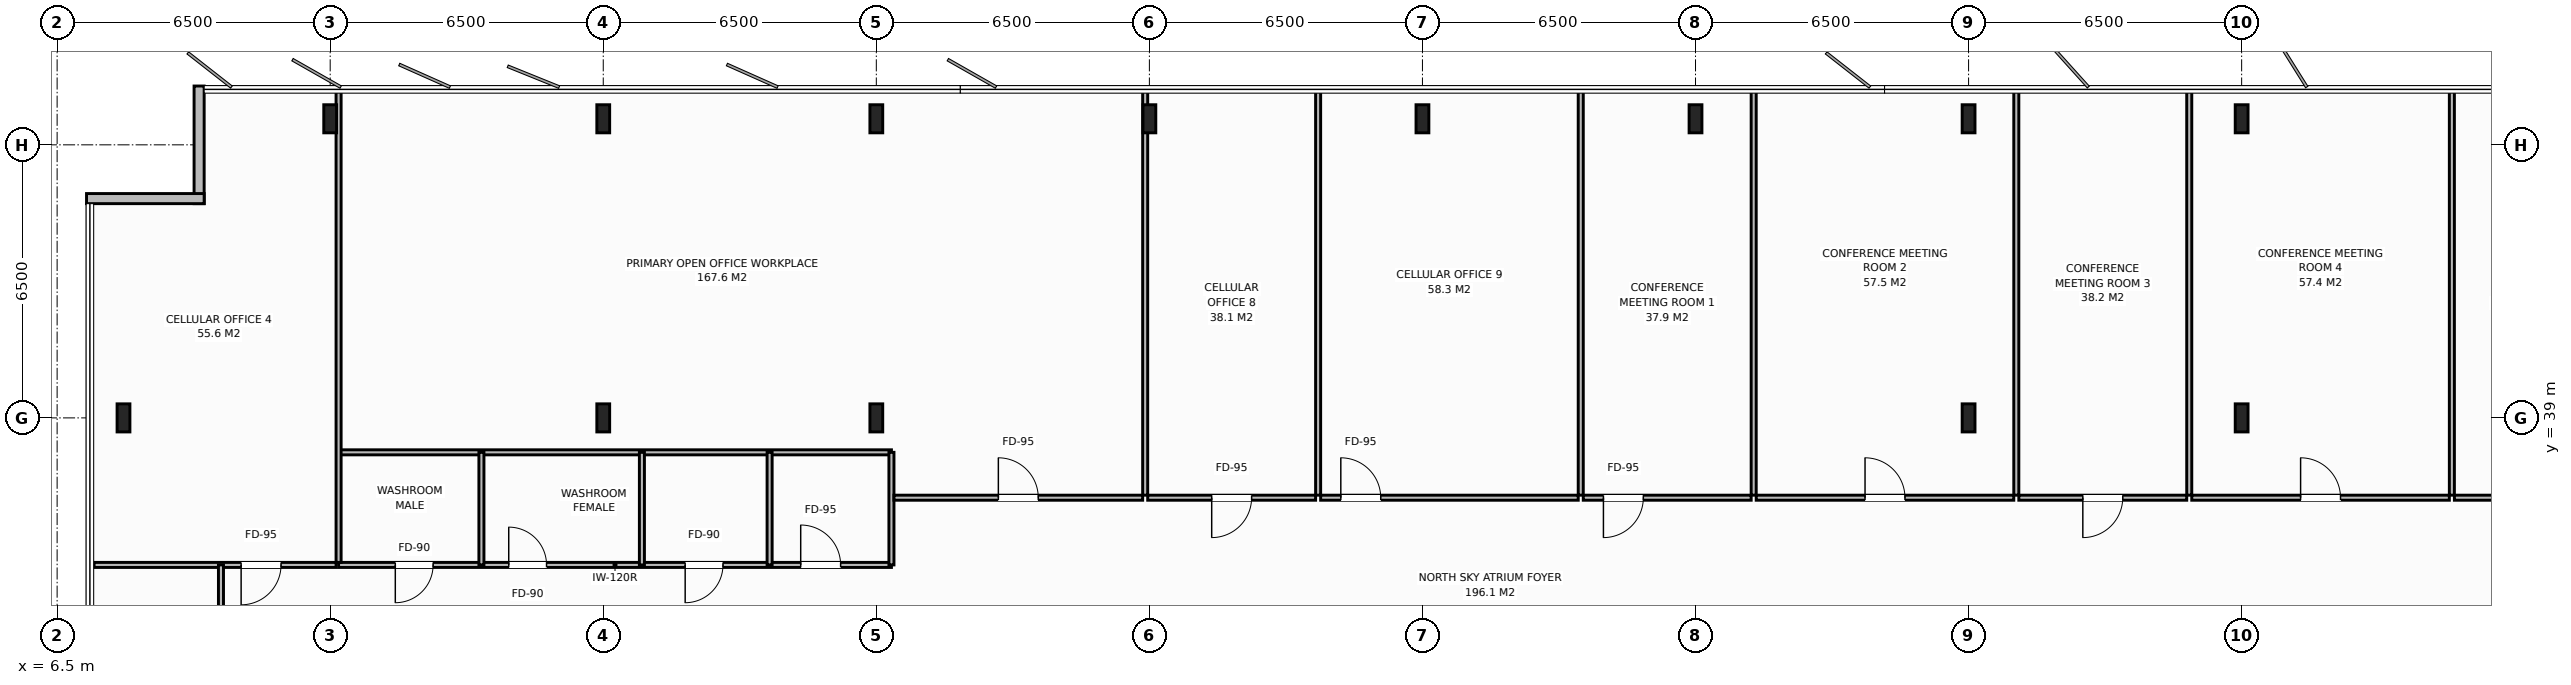
"""IFC4 building model, lengths in metres.
Left out: names, types, materials, properties, quantities, classifications, styles, units other than length and angle.
Written with IfcOpenShell. Run it as: python <this file> out.ifc"""

import sys

from ifc_helpers import new_model, si_unit, direction, frame, frame_2d, origin, origin_2d, place, context, subcontext, project, spatial, rectangle, i_section, extrude, element, fill, save


model = new_model("IFC4")
c1 = context("Model", 3, precision=1e-05, world=origin(), true_north=direction((0.0, 1.0)))
c2 = subcontext(c1, "Body", "Model", "MODEL_VIEW")
j1 = project(units=[si_unit("LENGTHUNIT", "METRE"), si_unit("PLANEANGLEUNIT", "RADIAN")], contexts=[c1])
p1 = place(None, origin())
s1 = spatial("IfcSite", under=j1, at=p1, CompositionType="ELEMENT")
p2 = place(p1, origin())
s2 = spatial("IfcBuilding", under=s1, at=p2, CompositionType="ELEMENT")
p3 = place(p2, frame((0.0, 0.0, 302.4)))
s3 = spatial("IfcBuildingStorey", under=s2, at=p3, CompositionType="ELEMENT", Elevation=302.4)
for number, where, z_axis, x_axis in (
    (1, (19.5, 39.0, 0.0), (0.0, 0.0, 1.0), (1.0, 0.0, 0.0)),
    (2, (58.5, 39.0, 0.0), (0.0, 0.0, 1.0), (1.0, 0.0, 0.0)),
    (3, (26.0, 39.0, 0.0), (0.0, 0.0, 1.0), (1.0, 0.0, 0.0)),
    (4, (52.0, 39.0, 0.0), (0.0, 0.0, 1.0), (1.0, 0.0, 0.0)),
    (5, (13.0, 46.12, 0.0), (0.0, 0.0, 1.0), (1.0, 0.0, 0.0)),
    (6, (19.5, 46.12, 0.0), (0.0, 0.0, 1.0), (1.0, 0.0, 0.0)),
    (7, (26.0, 46.12, 0.0), (0.0, 0.0, 1.0), (1.0, 0.0, 0.0)),
    (8, (32.5, 46.12, 0.0), (0.0, 0.0, 1.0), (1.0, 0.0, 0.0)),
    (9, (39.0, 46.12, 0.0), (0.0, 0.0, 1.0), (1.0, 0.0, 0.0)),
    (10, (45.5, 46.12, 0.0), (0.0, 0.0, 1.0), (1.0, 0.0, 0.0)),
    (11, (52.0, 46.12, 0.0), (0.0, 0.0, 1.0), (1.0, 0.0, 0.0)),
    (12, (58.5, 46.12, 0.0), (0.0, 0.0, 1.0), (1.0, 0.0, 0.0)),
    (13, (8.08, 39.0, 0.0), (0.0, 0.0, 1.0), (1.0, 0.0, 0.0)),
):
    element("IfcColumn", number, at=place(p3, frame(where, z_axis=z_axis, x_axis=x_axis)), inside=s3, PredefinedType="COLUMN", context=c2, shape_type="SweptSolid", body=[
        extrude(i_section(OverallWidth=0.305, OverallDepth=0.668, WebThickness=0.021, FlangeThickness=0.04, at=origin_2d()), origin(), (0.0, 0.0, 1.0), 4.0),
    ])
p4 = place(p3, frame((9.88, 44.1, 0.0), z_axis=(0.0, 0.0, 1.0), x_axis=(0.0, 1.0, 0.0)))
e14 = element("IfcWall", 14, at=p4, inside=s3, PredefinedType="STANDARD", context=c2, shape_type="SweptSolid", body=[
    extrude(rectangle(XDim=2.8, YDim=0.24, at=frame_2d((1.4, 0.0))), origin(), (0.0, 0.0, 1.0), 3.788),
])
p5 = place(p3, frame((7.2, 44.22, 0.0), z_axis=(0.0, 0.0, 1.0), x_axis=(1.0, 0.0, 0.0)))
e15 = element("IfcWall", 15, at=p5, inside=s3, PredefinedType="STANDARD", context=c2, shape_type="SweptSolid", body=[
    extrude(rectangle(XDim=2.8, YDim=0.24, at=frame_2d((1.4, 0.0))), origin(), (0.0, 0.0, 1.0), 3.788),
])
p6 = place(p3, frame((13.2, 35.5, 0.0), z_axis=(0.0, 0.0, 1.0), x_axis=(1.0, 0.0, 0.0)))
e16 = element("IfcWall", 16, at=p6, inside=s3, PredefinedType="PARTITIONING", context=c2, shape_type="SweptSolid", body=[
    extrude(rectangle(XDim=13.16, YDim=0.12, at=frame_2d((6.58, 0.0))), origin(), (0.0, 0.0, 1.0), 3.788),
])
p7 = place(p6, frame((1.35, 0.0, 0.0)))
e17 = element("IfcOpeningElement", 17, at=p7, cuts=e16, PredefinedType="OPENING", context=c2, shape_type="SweptSolid", body=[
    extrude(rectangle(XDim=0.9, YDim=2.15, at=frame_2d((0.45, 1.075))), frame((0.0, 0.07, 0.0), z_axis=(0.0, -1.0, 0.0), x_axis=(1.0, 0.0, 0.0)), (0.0, 0.0, 1.0), 0.14),
])
p8 = place(p6, frame((4.05, 0.0, 0.0)))
e18 = element("IfcOpeningElement", 18, at=p8, cuts=e16, PredefinedType="OPENING", context=c2, shape_type="SweptSolid", body=[
    extrude(rectangle(XDim=0.9, YDim=2.15, at=frame_2d((0.45, 1.075))), frame((0.0, 0.07, 0.0), z_axis=(0.0, -1.0, 0.0), x_axis=(1.0, 0.0, 0.0)), (0.0, 0.0, 1.0), 0.14),
])
p9 = place(p6, frame((8.25, 0.0, 0.0)))
e19 = element("IfcOpeningElement", 19, at=p9, cuts=e16, PredefinedType="OPENING", context=c2, shape_type="SweptSolid", body=[
    extrude(rectangle(XDim=0.9, YDim=2.15, at=frame_2d((0.45, 1.075))), frame((0.0, 0.07, 0.0), z_axis=(0.0, -1.0, 0.0), x_axis=(1.0, 0.0, 0.0)), (0.0, 0.0, 1.0), 0.14),
])
p10 = place(p6, frame((11.0, 0.0, 0.0)))
e20 = element("IfcOpeningElement", 20, at=p10, cuts=e16, PredefinedType="OPENING", context=c2, shape_type="SweptSolid", body=[
    extrude(rectangle(XDim=0.95, YDim=2.15, at=frame_2d((0.475, 1.075))), frame((0.0, 0.07, 0.0), z_axis=(0.0, -1.0, 0.0), x_axis=(1.0, 0.0, 0.0)), (0.0, 0.0, 1.0), 0.14),
])
p11 = place(p3, frame((13.2, 38.18, 0.0), z_axis=(0.0, 0.0, 1.0), x_axis=(1.0, 0.0, 0.0)))
e21 = element("IfcWall", 21, at=p11, inside=s3, PredefinedType="PARTITIONING", context=c2, shape_type="SweptSolid", body=[
    extrude(rectangle(XDim=13.16, YDim=0.12, at=frame_2d((6.58, 0.0))), origin(), (0.0, 0.0, 1.0), 3.788),
])
for number, where, z_axis, x_axis in (
    (22, (16.6, 35.5, 0.0), (0.0, 0.0, 1.0), (0.0, 1.0, 0.0)),
    (23, (20.42, 35.5, 0.0), (0.0, 0.0, 1.0), (0.0, 1.0, 0.0)),
    (24, (23.46, 35.5, 0.0), (0.0, 0.0, 1.0), (0.0, 1.0, 0.0)),
    (25, (26.36, 35.5, 0.0), (0.0, 0.0, 1.0), (0.0, 1.0, 0.0)),
):
    element("IfcWall", number, at=place(p3, frame(where, z_axis=z_axis, x_axis=x_axis)), inside=s3, PredefinedType="PARTITIONING", context=c2, shape_type="SweptSolid", body=[
        extrude(rectangle(XDim=2.68, YDim=0.12, at=frame_2d((1.34, 0.0))), origin(), (0.0, 0.0, 1.0), 3.788),
    ])
p12 = place(p3, frame((13.2, 35.56, 0.0), z_axis=(0.0, 0.0, 1.0), x_axis=(0.0, 1.0, 0.0)))
e26 = element("IfcWall", 26, at=p12, inside=s3, PredefinedType="PARTITIONING", context=c2, shape_type="SweptSolid", body=[
    extrude(rectangle(XDim=11.32, YDim=0.12, at=frame_2d((5.66, 0.0))), origin(), (0.0, 0.0, 1.0), 2.988),
])
p13 = place(p3, frame((7.38, 35.5, 0.0), z_axis=(0.0, 0.0, 1.0), x_axis=(1.0, 0.0, 0.0)))
e27 = element("IfcWall", 27, at=p13, inside=s3, PredefinedType="PARTITIONING", context=c2, shape_type="SweptSolid", body=[
    extrude(rectangle(XDim=5.76, YDim=0.12, at=frame_2d((2.88, 0.0))), origin(), (0.0, 0.0, 1.0), 3.788),
])
p14 = place(p13, frame((3.5, 0.0, 0.0)))
e28 = element("IfcOpeningElement", 28, at=p14, cuts=e27, PredefinedType="OPENING", context=c2, shape_type="SweptSolid", body=[
    extrude(rectangle(XDim=0.95, YDim=2.15, at=frame_2d((0.475, 1.075))), frame((0.0, 0.07, 0.0), z_axis=(0.0, -1.0, 0.0), x_axis=(1.0, 0.0, 0.0)), (0.0, 0.0, 1.0), 0.14),
])
p15 = place(p3, frame((32.4, 37.16, 0.0), z_axis=(0.0, 0.0, 1.0), x_axis=(0.0, 1.0, 0.0)))
e29 = element("IfcWall", 29, at=p15, inside=s3, PredefinedType="PARTITIONING", context=c2, shape_type="SweptSolid", body=[
    extrude(rectangle(XDim=9.72, YDim=0.12, at=frame_2d((4.86, 0.0))), origin(), (0.0, 0.0, 1.0), 2.988),
])
p16 = place(p3, frame((26.42, 37.1, 0.0), z_axis=(0.0, 0.0, 1.0), x_axis=(1.0, 0.0, 0.0)))
e30 = element("IfcWall", 30, at=p16, inside=s3, PredefinedType="PARTITIONING", context=c2, shape_type="SweptSolid", body=[
    extrude(rectangle(XDim=5.92, YDim=0.12, at=frame_2d((2.96, 0.0))), origin(), (0.0, 0.0, 1.0), 3.788),
])
p17 = place(p16, frame((2.485, 0.0, 0.0)))
e31 = element("IfcOpeningElement", 31, at=p17, cuts=e30, PredefinedType="OPENING", context=c2, shape_type="SweptSolid", body=[
    extrude(rectangle(XDim=0.95, YDim=2.15, at=frame_2d((0.475, 1.075))), frame((0.0, 0.07, 0.0), z_axis=(0.0, -1.0, 0.0), x_axis=(1.0, 0.0, 0.0)), (0.0, 0.0, 1.0), 0.14),
])
p18 = place(p3, frame((36.517, 37.16, 0.0), z_axis=(0.0, 0.0, 1.0), x_axis=(0.0, 1.0, 0.0)))
e32 = element("IfcWall", 32, at=p18, inside=s3, PredefinedType="PARTITIONING", context=c2, shape_type="SweptSolid", body=[
    extrude(rectangle(XDim=9.72, YDim=0.12, at=frame_2d((4.86, 0.0))), origin(), (0.0, 0.0, 1.0), 3.788),
])
p19 = place(p3, frame((32.46, 37.1, 0.0), z_axis=(0.0, 0.0, 1.0), x_axis=(1.0, 0.0, 0.0)))
e33 = element("IfcWall", 33, at=p19, inside=s3, PredefinedType="PARTITIONING", context=c2, shape_type="SweptSolid", body=[
    extrude(rectangle(XDim=3.997, YDim=0.12, at=frame_2d((1.999, 0.0))), origin(), (0.0, 0.0, 1.0), 3.788),
])
p20 = place(p19, frame((1.523, 0.0, 0.0)))
e34 = element("IfcOpeningElement", 34, at=p20, cuts=e33, PredefinedType="OPENING", context=c2, shape_type="SweptSolid", body=[
    extrude(rectangle(XDim=0.95, YDim=2.15, at=frame_2d((0.475, 1.075))), frame((0.0, 0.07, 0.0), z_axis=(0.0, -1.0, 0.0), x_axis=(1.0, 0.0, 0.0)), (0.0, 0.0, 1.0), 0.14),
])
p21 = place(p3, frame((42.768, 37.16, 0.0), z_axis=(0.0, 0.0, 1.0), x_axis=(0.0, 1.0, 0.0)))
e35 = element("IfcWall", 35, at=p21, inside=s3, PredefinedType="PARTITIONING", context=c2, shape_type="SweptSolid", body=[
    extrude(rectangle(XDim=9.72, YDim=0.12, at=frame_2d((4.86, 0.0))), origin(), (0.0, 0.0, 1.0), 3.788),
])
p22 = place(p3, frame((36.577, 37.1, 0.0), z_axis=(0.0, 0.0, 1.0), x_axis=(1.0, 0.0, 0.0)))
e36 = element("IfcWall", 36, at=p22, inside=s3, PredefinedType="PARTITIONING", context=c2, shape_type="SweptSolid", body=[
    extrude(rectangle(XDim=6.131, YDim=0.12, at=frame_2d((3.066, 0.0))), origin(), (0.0, 0.0, 1.0), 3.788),
])
p23 = place(p22, frame((0.48, 0.0, 0.0)))
e37 = element("IfcOpeningElement", 37, at=p23, cuts=e36, PredefinedType="OPENING", context=c2, shape_type="SweptSolid", body=[
    extrude(rectangle(XDim=0.95, YDim=2.15, at=frame_2d((0.475, 1.075))), frame((0.0, 0.07, 0.0), z_axis=(0.0, -1.0, 0.0), x_axis=(1.0, 0.0, 0.0)), (0.0, 0.0, 1.0), 0.14),
])
p24 = place(p3, frame((46.885, 37.16, 0.0), z_axis=(0.0, 0.0, 1.0), x_axis=(0.0, 1.0, 0.0)))
e38 = element("IfcWall", 38, at=p24, inside=s3, PredefinedType="PARTITIONING", context=c2, shape_type="SweptSolid", body=[
    extrude(rectangle(XDim=9.72, YDim=0.12, at=frame_2d((4.86, 0.0))), origin(), (0.0, 0.0, 1.0), 3.788),
])
p25 = place(p3, frame((42.828, 37.1, 0.0), z_axis=(0.0, 0.0, 1.0), x_axis=(1.0, 0.0, 0.0)))
e39 = element("IfcWall", 39, at=p25, inside=s3, PredefinedType="PARTITIONING", context=c2, shape_type="SweptSolid", body=[
    extrude(rectangle(XDim=3.997, YDim=0.12, at=frame_2d((1.999, 0.0))), origin(), (0.0, 0.0, 1.0), 3.788),
])
p26 = place(p25, frame((0.48, 0.0, 0.0)))
e40 = element("IfcOpeningElement", 40, at=p26, cuts=e39, PredefinedType="OPENING", context=c2, shape_type="SweptSolid", body=[
    extrude(rectangle(XDim=0.95, YDim=2.15, at=frame_2d((0.475, 1.075))), frame((0.0, 0.07, 0.0), z_axis=(0.0, -1.0, 0.0), x_axis=(1.0, 0.0, 0.0)), (0.0, 0.0, 1.0), 0.14),
])
p27 = place(p3, frame((53.136, 37.16, 0.0), z_axis=(0.0, 0.0, 1.0), x_axis=(0.0, 1.0, 0.0)))
e41 = element("IfcWall", 41, at=p27, inside=s3, PredefinedType="PARTITIONING", context=c2, shape_type="SweptSolid", body=[
    extrude(rectangle(XDim=9.72, YDim=0.12, at=frame_2d((4.86, 0.0))), origin(), (0.0, 0.0, 1.0), 3.788),
])
p28 = place(p3, frame((46.945, 37.1, 0.0), z_axis=(0.0, 0.0, 1.0), x_axis=(1.0, 0.0, 0.0)))
e42 = element("IfcWall", 42, at=p28, inside=s3, PredefinedType="PARTITIONING", context=c2, shape_type="SweptSolid", body=[
    extrude(rectangle(XDim=6.132, YDim=0.12, at=frame_2d((3.066, 0.0))), origin(), (0.0, 0.0, 1.0), 3.788),
])
p29 = place(p28, frame((2.591, 0.0, 0.0)))
e43 = element("IfcOpeningElement", 43, at=p29, cuts=e42, PredefinedType="OPENING", context=c2, shape_type="SweptSolid", body=[
    extrude(rectangle(XDim=0.95, YDim=2.15, at=frame_2d((0.475, 1.075))), frame((0.0, 0.07, 0.0), z_axis=(0.0, -1.0, 0.0), x_axis=(1.0, 0.0, 0.0)), (0.0, 0.0, 1.0), 0.14),
])
p30 = place(p3, frame((57.253, 37.16, 0.0), z_axis=(0.0, 0.0, 1.0), x_axis=(0.0, 1.0, 0.0)))
e44 = element("IfcWall", 44, at=p30, inside=s3, PredefinedType="PARTITIONING", context=c2, shape_type="SweptSolid", body=[
    extrude(rectangle(XDim=9.72, YDim=0.12, at=frame_2d((4.86, 0.0))), origin(), (0.0, 0.0, 1.0), 3.788),
])
p31 = place(p3, frame((53.196, 37.1, 0.0), z_axis=(0.0, 0.0, 1.0), x_axis=(1.0, 0.0, 0.0)))
e45 = element("IfcWall", 45, at=p31, inside=s3, PredefinedType="PARTITIONING", context=c2, shape_type="SweptSolid", body=[
    extrude(rectangle(XDim=3.997, YDim=0.12, at=frame_2d((1.999, 0.0))), origin(), (0.0, 0.0, 1.0), 3.788),
])
p32 = place(p31, frame((1.523, 0.0, 0.0)))
e46 = element("IfcOpeningElement", 46, at=p32, cuts=e45, PredefinedType="OPENING", context=c2, shape_type="SweptSolid", body=[
    extrude(rectangle(XDim=0.95, YDim=2.15, at=frame_2d((0.475, 1.075))), frame((0.0, 0.07, 0.0), z_axis=(0.0, -1.0, 0.0), x_axis=(1.0, 0.0, 0.0)), (0.0, 0.0, 1.0), 0.14),
])
p33 = place(p3, frame((63.504, 37.16, 0.0), z_axis=(0.0, 0.0, 1.0), x_axis=(0.0, 1.0, 0.0)))
e47 = element("IfcWall", 47, at=p33, inside=s3, PredefinedType="PARTITIONING", context=c2, shape_type="SweptSolid", body=[
    extrude(rectangle(XDim=9.72, YDim=0.12, at=frame_2d((4.86, 0.0))), origin(), (0.0, 0.0, 1.0), 3.788),
])
p34 = place(p3, frame((57.313, 37.1, 0.0), z_axis=(0.0, 0.0, 1.0), x_axis=(1.0, 0.0, 0.0)))
e48 = element("IfcWall", 48, at=p34, inside=s3, PredefinedType="PARTITIONING", context=c2, shape_type="SweptSolid", body=[
    extrude(rectangle(XDim=6.131, YDim=0.12, at=frame_2d((3.066, 0.0))), origin(), (0.0, 0.0, 1.0), 3.788),
])
p35 = place(p34, frame((2.591, 0.0, 0.0)))
e49 = element("IfcOpeningElement", 49, at=p35, cuts=e48, PredefinedType="OPENING", context=c2, shape_type="SweptSolid", body=[
    extrude(rectangle(XDim=0.95, YDim=2.15, at=frame_2d((0.475, 1.075))), frame((0.0, 0.07, 0.0), z_axis=(0.0, -1.0, 0.0), x_axis=(1.0, 0.0, 0.0)), (0.0, 0.0, 1.0), 0.14),
])
p36 = place(p3, frame((63.564, 37.1, 0.0), z_axis=(0.0, 0.0, 1.0), x_axis=(1.0, 0.0, 0.0)))
e50 = element("IfcWall", 50, at=p36, inside=s3, PredefinedType="PARTITIONING", context=c2, shape_type="SweptSolid", body=[
    extrude(rectangle(XDim=3.997, YDim=0.12, at=frame_2d((1.998, 0.0))), origin(), (0.0, 0.0, 1.0), 3.788),
])
p37 = place(p36, frame((2.567, 0.0, 0.0)))
e51 = element("IfcOpeningElement", 51, at=p37, cuts=e50, PredefinedType="OPENING", context=c2, shape_type="SweptSolid", body=[
    extrude(rectangle(XDim=0.95, YDim=2.15, at=frame_2d((0.475, 1.075))), frame((0.0, 0.07, 0.0), z_axis=(0.0, -1.0, 0.0), x_axis=(1.0, 0.0, 0.0)), (0.0, 0.0, 1.0), 0.14),
])
p38 = place(p3, frame((10.4, 16.5, 0.0), z_axis=(0.0, 0.0, 1.0), x_axis=(0.0, 1.0, 0.0)))
e52 = element("IfcWall", 52, at=p38, inside=s3, PredefinedType="PARTITIONING", context=c2, shape_type="SweptSolid", body=[
    extrude(rectangle(XDim=19.0, YDim=0.12, at=frame_2d((9.5, 0.0))), origin(), (0.0, 0.0, 1.0), 3.788),
])
p39 = place(p38, frame((9.025, 0.0, 0.0)))
e53 = element("IfcOpeningElement", 53, at=p39, cuts=e52, PredefinedType="OPENING", context=c2, shape_type="SweptSolid", body=[
    extrude(rectangle(XDim=0.95, YDim=2.15, at=frame_2d((0.475, 1.075))), frame((0.0, 0.07, 0.0), z_axis=(0.0, -1.0, 0.0), x_axis=(1.0, 0.0, 0.0)), (0.0, 0.0, 1.0), 0.14),
])
p40 = place(p7, origin())
e54 = element("IfcDoor", 54, at=p40, inside=s3, OperationType="SINGLE_SWING_RIGHT", PredefinedType="DOOR", context=c2, shape_type="SweptSolid", body=[
    extrude(rectangle(XDim=0.9, YDim=2.15, at=frame_2d((0.45, 1.075))), frame((0.0, 0.025, 0.0), z_axis=(0.0, -1.0, 0.0), x_axis=(1.0, 0.0, 0.0)), (0.0, 0.0, 1.0), 0.05),
])
fill(e17, e54)
p41 = place(p8, origin())
e55 = element("IfcDoor", 55, at=p41, inside=s3, OperationType="SINGLE_SWING_LEFT", PredefinedType="DOOR", context=c2, shape_type="SweptSolid", body=[
    extrude(rectangle(XDim=0.9, YDim=2.15, at=frame_2d((0.45, 1.075))), frame((0.0, 0.025, 0.0), z_axis=(0.0, -1.0, 0.0), x_axis=(1.0, 0.0, 0.0)), (0.0, 0.0, 1.0), 0.05),
])
fill(e18, e55)
p42 = place(p9, origin())
e56 = element("IfcDoor", 56, at=p42, inside=s3, OperationType="SINGLE_SWING_RIGHT", PredefinedType="DOOR", context=c2, shape_type="SweptSolid", body=[
    extrude(rectangle(XDim=0.9, YDim=2.15, at=frame_2d((0.45, 1.075))), frame((0.0, 0.025, 0.0), z_axis=(0.0, -1.0, 0.0), x_axis=(1.0, 0.0, 0.0)), (0.0, 0.0, 1.0), 0.05),
])
fill(e19, e56)
p43 = place(p10, origin())
e57 = element("IfcDoor", 57, at=p43, inside=s3, OperationType="SINGLE_SWING_LEFT", PredefinedType="DOOR", context=c2, shape_type="SweptSolid", body=[
    extrude(rectangle(XDim=0.95, YDim=2.15, at=frame_2d((0.475, 1.075))), frame((0.0, 0.025, 0.0), z_axis=(0.0, -1.0, 0.0), x_axis=(1.0, 0.0, 0.0)), (0.0, 0.0, 1.0), 0.05),
])
fill(e20, e57)
p44 = place(p14, origin())
e58 = element("IfcDoor", 58, at=p44, inside=s3, OperationType="SINGLE_SWING_RIGHT", PredefinedType="DOOR", context=c2, shape_type="SweptSolid", body=[
    extrude(rectangle(XDim=0.95, YDim=2.15, at=frame_2d((0.475, 1.075))), frame((0.0, 0.025, 0.0), z_axis=(0.0, -1.0, 0.0), x_axis=(1.0, 0.0, 0.0)), (0.0, 0.0, 1.0), 0.05),
])
fill(e28, e58)
p45 = place(p17, origin())
e59 = element("IfcDoor", 59, at=p45, inside=s3, OperationType="SINGLE_SWING_LEFT", PredefinedType="DOOR", context=c2, shape_type="SweptSolid", body=[
    extrude(rectangle(XDim=0.95, YDim=2.15, at=frame_2d((0.475, 1.075))), frame((0.0, 0.025, 0.0), z_axis=(0.0, -1.0, 0.0), x_axis=(1.0, 0.0, 0.0)), (0.0, 0.0, 1.0), 0.05),
])
fill(e31, e59)
p46 = place(p20, origin())
e60 = element("IfcDoor", 60, at=p46, inside=s3, OperationType="SINGLE_SWING_RIGHT", PredefinedType="DOOR", context=c2, shape_type="SweptSolid", body=[
    extrude(rectangle(XDim=0.95, YDim=2.15, at=frame_2d((0.475, 1.075))), frame((0.0, 0.025, 0.0), z_axis=(0.0, -1.0, 0.0), x_axis=(1.0, 0.0, 0.0)), (0.0, 0.0, 1.0), 0.05),
])
fill(e34, e60)
p47 = place(p23, origin())
e61 = element("IfcDoor", 61, at=p47, inside=s3, OperationType="SINGLE_SWING_LEFT", PredefinedType="DOOR", context=c2, shape_type="SweptSolid", body=[
    extrude(rectangle(XDim=0.95, YDim=2.15, at=frame_2d((0.475, 1.075))), frame((0.0, 0.025, 0.0), z_axis=(0.0, -1.0, 0.0), x_axis=(1.0, 0.0, 0.0)), (0.0, 0.0, 1.0), 0.05),
])
fill(e37, e61)
p48 = place(p26, origin())
e62 = element("IfcDoor", 62, at=p48, inside=s3, OperationType="SINGLE_SWING_RIGHT", PredefinedType="DOOR", context=c2, shape_type="SweptSolid", body=[
    extrude(rectangle(XDim=0.95, YDim=2.15, at=frame_2d((0.475, 1.075))), frame((0.0, 0.025, 0.0), z_axis=(0.0, -1.0, 0.0), x_axis=(1.0, 0.0, 0.0)), (0.0, 0.0, 1.0), 0.05),
])
fill(e40, e62)
p49 = place(p29, origin())
e63 = element("IfcDoor", 63, at=p49, inside=s3, OperationType="SINGLE_SWING_LEFT", PredefinedType="DOOR", context=c2, shape_type="SweptSolid", body=[
    extrude(rectangle(XDim=0.95, YDim=2.15, at=frame_2d((0.475, 1.075))), frame((0.0, 0.025, 0.0), z_axis=(0.0, -1.0, 0.0), x_axis=(1.0, 0.0, 0.0)), (0.0, 0.0, 1.0), 0.05),
])
fill(e43, e63)
p50 = place(p32, origin())
e64 = element("IfcDoor", 64, at=p50, inside=s3, OperationType="SINGLE_SWING_RIGHT", PredefinedType="DOOR", context=c2, shape_type="SweptSolid", body=[
    extrude(rectangle(XDim=0.95, YDim=2.15, at=frame_2d((0.475, 1.075))), frame((0.0, 0.025, 0.0), z_axis=(0.0, -1.0, 0.0), x_axis=(1.0, 0.0, 0.0)), (0.0, 0.0, 1.0), 0.05),
])
fill(e46, e64)
p51 = place(p35, origin())
e65 = element("IfcDoor", 65, at=p51, inside=s3, OperationType="SINGLE_SWING_LEFT", PredefinedType="DOOR", context=c2, shape_type="SweptSolid", body=[
    extrude(rectangle(XDim=0.95, YDim=2.15, at=frame_2d((0.475, 1.075))), frame((0.0, 0.025, 0.0), z_axis=(0.0, -1.0, 0.0), x_axis=(1.0, 0.0, 0.0)), (0.0, 0.0, 1.0), 0.05),
])
fill(e49, e65)
save(model, sys.argv[1])
